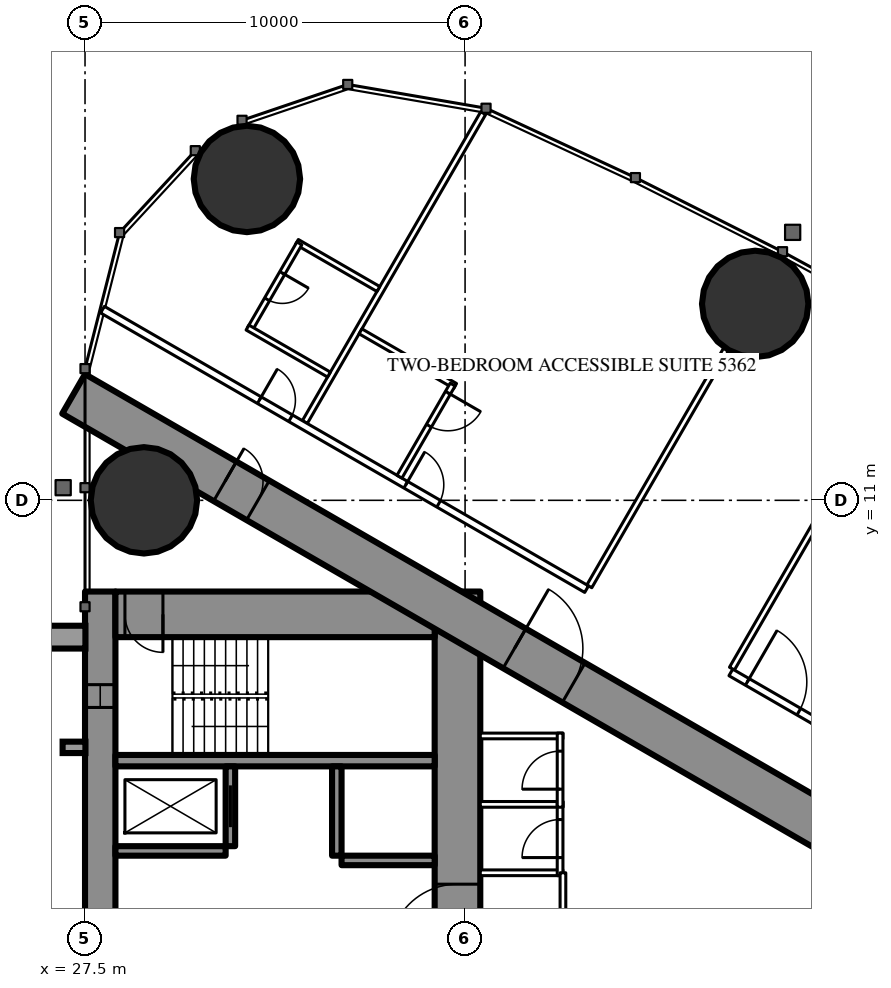
"""IFC4 building model, lengths in metres.
Left out: names, types, materials, properties, quantities, classifications, styles, units other than length and angle.
Written with IfcOpenShell. Run it as: python <this file> out.ifc"""

import sys

from ifc_helpers import new_model, si_unit, direction, frame, frame_2d, origin, origin_2d, place, context, subcontext, project, spatial, rectangle, circle, extrude, element, fill, save


model = new_model("IFC4")
c1 = context("Model", 3, precision=1e-05, world=origin(), true_north=direction((0.0, 1.0)))
c2 = subcontext(c1, "Body", "Model", "MODEL_VIEW")
j1 = project(units=[si_unit("LENGTHUNIT", "METRE"), si_unit("PLANEANGLEUNIT", "RADIAN")], contexts=[c1])
p1 = place(None, origin())
s1 = spatial("IfcSite", under=j1, at=p1, CompositionType="ELEMENT")
p2 = place(p1, origin())
s2 = spatial("IfcBuilding", under=s1, at=p2, CompositionType="ELEMENT")
p3 = place(p2, frame((0.0, 0.0, 198.3)))
s3 = spatial("IfcBuildingStorey", under=s2, at=p3, CompositionType="ELEMENT", Elevation=198.3)
for number, where, z_axis, x_axis in (
    (1, (31.76, 19.456, 0.0), (0.0, 0.0, 1.0), (1.0, 0.0, 0.0)),
    (2, (29.05, 11.0, 0.0), (0.0, 0.0, 1.0), (1.0, 0.0, 0.0)),
    (3, (45.134, 16.168, 0.0), (0.0, 0.0, 1.0), (1.0, 0.0, 0.0)),
):
    element("IfcColumn", number, at=place(p3, frame(where, z_axis=z_axis, x_axis=x_axis)), inside=s3, PredefinedType="COLUMN", context=c2, shape_type="SweptSolid", body=[
        extrude(circle(Radius=1.4, at=origin_2d()), origin(), (0.0, 0.0, 1.0), 3.5),
    ])
p4 = place(p3, frame((27.9, -8.6, 0.0), z_axis=(0.0, 0.0, 1.0), x_axis=(0.0, 1.0, 0.0)))
e4 = element("IfcWall", 4, at=p4, inside=s3, PredefinedType="SHEAR", context=c2, shape_type="SweptSolid", body=[
    extrude(rectangle(XDim=17.2, YDim=0.8, at=frame_2d((8.6, 0.0))), origin(), (0.0, 0.0, 1.0), 3.5),
])
p5 = place(p4, frame((2.45, 0.0, 0.6)))
e5 = element("IfcOpeningElement", 5, at=p5, cuts=e4, PredefinedType="OPENING", context=c2, shape_type="SweptSolid", body=[
    extrude(rectangle(XDim=0.6, YDim=2.1, at=frame_2d((0.3, 1.05))), frame((0.0, 0.41, 0.0), z_axis=(0.0, -1.0, 0.0), x_axis=(1.0, 0.0, 0.0)), (0.0, 0.0, 1.0), 0.82),
])
p6 = place(p4, frame((14.15, 0.0, 0.6)))
e6 = element("IfcOpeningElement", 6, at=p6, cuts=e4, PredefinedType="OPENING", context=c2, shape_type="SweptSolid", body=[
    extrude(rectangle(XDim=0.6, YDim=2.1, at=frame_2d((0.3, 1.05))), frame((0.0, 0.41, 0.0), z_axis=(0.0, -1.0, 0.0), x_axis=(1.0, 0.0, 0.0)), (0.0, 0.0, 1.0), 0.82),
])
p7 = place(p3, frame((37.3, -8.6, 0.0), z_axis=(0.0, 0.0, 1.0), x_axis=(0.0, 1.0, 0.0)))
e7 = element("IfcWall", 7, at=p7, inside=s3, PredefinedType="SHEAR", context=c2, shape_type="SweptSolid", body=[
    extrude(rectangle(XDim=17.2, YDim=1.2, at=frame_2d((8.6, 0.0))), origin(), (0.0, 0.0, 1.0), 3.5),
])
p8 = place(p7, frame((7.7, 0.0, 0.0)))
e8 = element("IfcOpeningElement", 8, at=p8, cuts=e7, PredefinedType="OPENING", context=c2, shape_type="SweptSolid", body=[
    extrude(rectangle(XDim=1.8, YDim=2.2, at=frame_2d((0.9, 1.1))), frame((0.0, 0.61, 0.0), z_axis=(0.0, -1.0, 0.0), x_axis=(1.0, 0.0, 0.0)), (0.0, 0.0, 1.0), 1.22),
])
p9 = place(p3, frame((28.3, 8.0, 0.0), z_axis=(0.0, 0.0, 1.0), x_axis=(1.0, 0.0, 0.0)))
e9 = element("IfcWall", 9, at=p9, inside=s3, PredefinedType="SHEAR", context=c2, shape_type="SweptSolid", body=[
    extrude(rectangle(XDim=8.4, YDim=1.2, at=frame_2d((4.2, 0.0))), origin(), (0.0, 0.0, 1.0), 3.5),
])
p10 = place(p9, frame((0.25, 0.0, 0.0)))
e10 = element("IfcOpeningElement", 10, at=p10, cuts=e9, PredefinedType="OPENING", context=c2, shape_type="SweptSolid", body=[
    extrude(rectangle(XDim=1.0, YDim=2.2, at=frame_2d((0.5, 1.1))), frame((0.0, 0.61, 0.0), z_axis=(0.0, -1.0, 0.0), x_axis=(1.0, 0.0, 0.0)), (0.0, 0.0, 1.0), 1.22),
])
p11 = place(p3, frame((28.3, 4.15, 0.0), z_axis=(0.0, 0.0, 1.0), x_axis=(1.0, 0.0, 0.0)))
e11 = element("IfcWall", 11, at=p11, inside=s3, PredefinedType="SHEAR", context=c2, shape_type="SweptSolid", body=[
    extrude(rectangle(XDim=8.4, YDim=0.3, at=frame_2d((4.2, 0.0))), origin(), (0.0, 0.0, 1.0), 3.5),
])
p12 = place(p3, frame((31.325, 1.9, 0.0), z_axis=(0.0, 0.0, 1.0), x_axis=(0.0, 1.0, 0.0)))
e12 = element("IfcWall", 12, at=p12, inside=s3, PredefinedType="SHEAR", context=c2, shape_type="SweptSolid", body=[
    extrude(rectangle(XDim=2.1, YDim=0.25, at=frame_2d((1.05, 0.0))), origin(), (0.0, 0.0, 1.0), 3.5),
])
p13 = place(p12, frame((0.5, 0.0, 0.0)))
e13 = element("IfcOpeningElement", 13, at=p13, cuts=e12, PredefinedType="OPENING", context=c2, shape_type="SweptSolid", body=[
    extrude(rectangle(XDim=1.1, YDim=2.2, at=frame_2d((0.55, 1.1))), frame((0.0, 0.135, 0.0), z_axis=(0.0, -1.0, 0.0), x_axis=(1.0, 0.0, 0.0)), (0.0, 0.0, 1.0), 0.27),
])
p14 = place(p3, frame((34.125, 1.65, 0.0), z_axis=(0.0, 0.0, 1.0), x_axis=(0.0, 1.0, 0.0)))
e14 = element("IfcWall", 14, at=p14, inside=s3, PredefinedType="SHEAR", context=c2, shape_type="SweptSolid", body=[
    extrude(rectangle(XDim=2.35, YDim=0.25, at=frame_2d((1.175, 0.0))), origin(), (0.0, 0.0, 1.0), 3.5),
])
p15 = place(p3, frame((28.3, 1.775, 0.0), z_axis=(0.0, 0.0, 1.0), x_axis=(1.0, 0.0, 0.0)))
e15 = element("IfcWall", 15, at=p15, inside=s3, PredefinedType="SHEAR", context=c2, shape_type="SweptSolid", body=[
    extrude(rectangle(XDim=2.9, YDim=0.25, at=frame_2d((1.45, 0.0))), origin(), (0.0, 0.0, 1.0), 3.5),
])
p16 = place(p3, frame((34.25, 1.525, 0.0), z_axis=(0.0, 0.0, 1.0), x_axis=(1.0, 0.0, 0.0)))
e16 = element("IfcWall", 16, at=p16, inside=s3, PredefinedType="SHEAR", context=c2, shape_type="SweptSolid", body=[
    extrude(rectangle(XDim=2.45, YDim=0.25, at=frame_2d((1.225, 0.0))), origin(), (0.0, 0.0, 1.0), 3.5),
])
p17 = place(p3, frame((27.2, -13.8, 0.0), z_axis=(0.0, 0.0, 1.0), x_axis=(0.866027159892, 0.499996958321, 0.0)))
e17 = element("IfcWall", 17, at=p17, inside=s3, PredefinedType="SHEAR", context=c2, shape_type="SweptSolid", body=[
    extrude(rectangle(XDim=27.947, YDim=1.2, at=frame_2d((13.973, 0.0))), origin(), (0.0, 0.0, 1.0), 3.5),
])
p18 = place(p17, frame((4.6, 0.0, 0.0)))
e18 = element("IfcOpeningElement", 18, at=p18, cuts=e17, PredefinedType="OPENING", context=c2, shape_type="SweptSolid", body=[
    extrude(rectangle(XDim=1.0, YDim=2.2, at=frame_2d((0.5, 1.1))), frame((0.0, 0.61, 0.0), z_axis=(0.0, -1.0, 0.0), x_axis=(1.0, 0.0, 0.0)), (0.0, 0.0, 1.0), 1.22),
])
p19 = place(p17, frame((13.395, 0.0, 0.0)))
e19 = element("IfcOpeningElement", 19, at=p19, cuts=e17, PredefinedType="OPENING", context=c2, shape_type="SweptSolid", body=[
    extrude(rectangle(XDim=1.8, YDim=2.2, at=frame_2d((0.9, 1.1))), frame((0.0, 0.61, 0.0), z_axis=(0.0, -1.0, 0.0), x_axis=(1.0, 0.0, 0.0)), (0.0, 0.0, 1.0), 1.22),
])
p20 = place(p3, frame((27.2, 13.8, 0.0), z_axis=(0.0, 0.0, 1.0), x_axis=(0.866024515034, -0.500001539357, 0.0)))
e20 = element("IfcWall", 20, at=p20, inside=s3, PredefinedType="SHEAR", context=c2, shape_type="SweptSolid", body=[
    extrude(rectangle(XDim=26.907, YDim=1.2, at=frame_2d((13.454, 0.0))), origin(), (0.0, 0.0, 1.0), 3.5),
])
p21 = place(p20, frame((4.6, 0.0, 0.0)))
e21 = element("IfcOpeningElement", 21, at=p21, cuts=e20, PredefinedType="OPENING", context=c2, shape_type="SweptSolid", body=[
    extrude(rectangle(XDim=1.0, YDim=2.2, at=frame_2d((0.5, 1.1))), frame((0.0, 0.61, 0.0), z_axis=(0.0, -1.0, 0.0), x_axis=(1.0, 0.0, 0.0)), (0.0, 0.0, 1.0), 1.22),
])
p22 = place(p20, frame((13.395, 0.0, 0.0)))
e22 = element("IfcOpeningElement", 22, at=p22, cuts=e20, PredefinedType="OPENING", context=c2, shape_type="SweptSolid", body=[
    extrude(rectangle(XDim=1.8, YDim=2.2, at=frame_2d((0.9, 1.1))), frame((0.0, 0.61, 0.0), z_axis=(0.0, -1.0, 0.0), x_axis=(1.0, 0.0, 0.0)), (0.0, 0.0, 1.0), 1.22),
])
p23 = place(p3, frame((33.284, 13.059, 0.0), z_axis=(0.0, 0.0, 1.0), x_axis=(0.499985904184, 0.866033541855, 0.0)))
e23 = element("IfcWall", 23, at=p23, inside=s3, PredefinedType="PARTITIONING", context=c2, shape_type="SweptSolid", body=[
    extrude(rectangle(XDim=9.385, YDim=0.15, at=frame_2d((4.693, 0.0))), origin(), (0.0, 0.0, 1.0), 3.25),
])
p24 = place(p3, frame((40.769, 8.737, 0.0), z_axis=(0.0, 0.0, 1.0), x_axis=(0.500013115284, 0.866017831539, 0.0)))
e24 = element("IfcWall", 24, at=p24, inside=s3, PredefinedType="PARTITIONING", context=c2, shape_type="SweptSolid", body=[
    extrude(rectangle(XDim=7.198, YDim=0.15, at=frame_2d((3.599, 0.0))), origin(), (0.0, 0.0, 1.0), 2.3),
])
p25 = place(p3, frame((44.521, 6.571, 0.0), z_axis=(0.0, 0.0, 1.0), x_axis=(0.500020376429, 0.866013639128, 0.0)))
e25 = element("IfcWall", 25, at=p25, inside=s3, PredefinedType="PARTITIONING", context=c2, shape_type="SweptSolid", body=[
    extrude(rectangle(XDim=7.306, YDim=0.15, at=frame_2d((3.653, 0.0))), origin(), (0.0, 0.0, 1.0), 2.3),
])
p26 = place(p3, frame((47.606, 6.643, 0.0), z_axis=(0.0, 0.0, 1.0), x_axis=(-0.514237157483, -0.857648031458, 0.0)))
e26 = element("IfcWall", 26, at=p26, inside=s3, PredefinedType="PARTITIONING", context=c2, shape_type="SweptSolid", body=[
    extrude(rectangle(XDim=1.805, YDim=0.15, at=frame_2d((0.902, 0.0))), origin(), (0.0, 0.0, 1.0), 3.25),
])
p27 = place(p3, frame((27.959, 16.017, 0.0), z_axis=(0.0, 0.0, 1.0), x_axis=(0.866024165033, -0.500002145574, 0.0)))
e27 = element("IfcWall", 27, at=p27, inside=s3, PredefinedType="PARTITIONING", context=c2, shape_type="SweptSolid", body=[
    extrude(rectangle(XDim=14.709, YDim=0.2, at=frame_2d((7.354, 0.0))), origin(), (0.0, 0.0, 1.0), 3.25),
])
p28 = place(p27, frame((9.215, 0.0, 0.0)))
e28 = element("IfcOpeningElement", 28, at=p28, cuts=e27, PredefinedType="OPENING", context=c2, shape_type="SweptSolid", body=[
    extrude(rectangle(XDim=1.0, YDim=2.2, at=frame_2d((0.5, 1.1))), frame((0.0, 0.11, 0.0), z_axis=(0.0, -1.0, 0.0), x_axis=(1.0, 0.0, 0.0)), (0.0, 0.0, 1.0), 0.22),
])
p29 = place(p27, frame((4.765, 0.0, 0.0)))
e29 = element("IfcOpeningElement", 29, at=p29, cuts=e27, PredefinedType="OPENING", context=c2, shape_type="SweptSolid", body=[
    extrude(rectangle(XDim=0.95, YDim=2.2, at=frame_2d((0.475, 1.1))), frame((0.0, 0.11, 0.0), z_axis=(0.0, -1.0, 0.0), x_axis=(1.0, 0.0, 0.0)), (0.0, 0.0, 1.0), 0.22),
])
p30 = place(p3, frame((44.493, 6.472, 0.0), z_axis=(0.0, 0.0, 1.0), x_axis=(0.866027140358, -0.499996992154, 0.0)))
e30 = element("IfcWall", 30, at=p30, inside=s3, PredefinedType="PARTITIONING", context=c2, shape_type="SweptSolid", body=[
    extrude(rectangle(XDim=2.566, YDim=0.2, at=frame_2d((1.283, 0.0))), origin(), (0.0, 0.0, 1.0), 3.25),
])
p31 = place(p30, frame((0.5, 0.0, 0.0)))
e31 = element("IfcOpeningElement", 31, at=p31, cuts=e30, PredefinedType="OPENING", context=c2, shape_type="SweptSolid", body=[
    extrude(rectangle(XDim=1.566, YDim=2.2, at=frame_2d((0.783, 1.1))), frame((0.0, 0.11, 0.0), z_axis=(0.0, -1.0, 0.0), x_axis=(1.0, 0.0, 0.0)), (0.0, 0.0, 1.0), 0.22),
])
p32 = place(p3, frame((34.749, 15.446, 0.0), z_axis=(0.0, 0.0, 1.0), x_axis=(0.866018712932, -0.500011588718, 0.0)))
e32 = element("IfcWall", 32, at=p32, inside=s3, PredefinedType="PARTITIONING", context=c2, shape_type="SweptSolid", body=[
    extrude(rectangle(XDim=2.875, YDim=0.15, at=frame_2d((1.438, 0.0))), origin(), (0.0, 0.0, 1.0), 3.25),
])
p33 = place(p3, frame((35.773, 11.621, 0.0), z_axis=(0.0, 0.0, 1.0), x_axis=(0.49998411664, 0.866034573852, 0.0)))
e33 = element("IfcWall", 33, at=p33, inside=s3, PredefinedType="PARTITIONING", context=c2, shape_type="SweptSolid", body=[
    extrude(rectangle(XDim=2.8, YDim=0.15, at=frame_2d((1.4, 0.0))), origin(), (0.0, 0.0, 1.0), 3.25),
])
p34 = place(p33, frame((1.55, 0.0, 0.0)))
e34 = element("IfcOpeningElement", 34, at=p34, cuts=e33, PredefinedType="OPENING", context=c2, shape_type="SweptSolid", body=[
    extrude(rectangle(XDim=1.0, YDim=2.2, at=frame_2d((0.5, 1.1))), frame((0.0, 0.085, 0.0), z_axis=(0.0, -1.0, 0.0), x_axis=(1.0, 0.0, 0.0)), (0.0, 0.0, 1.0), 0.17),
])
p35 = place(p3, frame((33.075, 17.798, 0.0), z_axis=(0.0, 0.0, 1.0), x_axis=(0.866006523861, -0.500032699561, 0.0)))
e35 = element("IfcWall", 35, at=p35, inside=s3, PredefinedType="PARTITIONING", context=c2, shape_type="SweptSolid", body=[
    extrude(rectangle(XDim=2.475, YDim=0.15, at=frame_2d((1.237, 0.0))), origin(), (0.0, 0.0, 1.0), 3.25),
])
p36 = place(p3, frame((31.84, 15.509, 0.0), z_axis=(0.0, 0.0, 1.0), x_axis=(0.500006934395, 0.866021400173, 0.0)))
e36 = element("IfcWall", 36, at=p36, inside=s3, PredefinedType="PARTITIONING", context=c2, shape_type="SweptSolid", body=[
    extrude(rectangle(XDim=2.6, YDim=0.15, at=frame_2d((1.3, 0.0))), origin(), (0.0, 0.0, 1.0), 3.25),
])
p37 = place(p36, frame((0.9, 0.0, 0.0)))
e37 = element("IfcOpeningElement", 37, at=p37, cuts=e36, PredefinedType="OPENING", context=c2, shape_type="SweptSolid", body=[
    extrude(rectangle(XDim=0.8, YDim=2.2, at=frame_2d((0.4, 1.1))), frame((0.0, 0.085, 0.0), z_axis=(0.0, -1.0, 0.0), x_axis=(1.0, 0.0, 0.0)), (0.0, 0.0, 1.0), 0.17),
])
p38 = place(p3, frame((31.775, 15.546, 0.0), z_axis=(0.0, 0.0, 1.0), x_axis=(0.866031185235, -0.4999899861, 0.0)))
e38 = element("IfcWall", 38, at=p38, inside=s3, PredefinedType="PARTITIONING", context=c2, shape_type="SweptSolid", body=[
    extrude(rectangle(XDim=2.475, YDim=0.15, at=frame_2d((1.238, 0.0))), origin(), (0.0, 0.0, 1.0), 3.25),
])
for number, where, z_axis, x_axis in (
    (39, (37.9, 1.2, 0.0), (0.0, 0.0, 1.0), (1.0, 0.0, 0.0)),
    (40, (37.9, 3.0, 0.0), (0.0, 0.0, 1.0), (1.0, 0.0, 0.0)),
    (41, (37.9, 4.8, 0.0), (0.0, 0.0, 1.0), (1.0, 0.0, 0.0)),
):
    element("IfcWall", number, at=place(p3, frame(where, z_axis=z_axis, x_axis=x_axis)), inside=s3, PredefinedType="PARTITIONING", context=c2, shape_type="SweptSolid", body=[
        extrude(rectangle(XDim=2.175, YDim=0.15, at=frame_2d((1.087, 0.0))), origin(), (0.0, 0.0, 1.0), 3.25),
    ])
p39 = place(p3, frame((40.0, 1.125, 0.0), z_axis=(0.0, 0.0, 1.0), x_axis=(0.0, 1.0, 0.0)))
e42 = element("IfcWall", 42, at=p39, inside=s3, PredefinedType="PARTITIONING", context=c2, shape_type="SweptSolid", body=[
    extrude(rectangle(XDim=1.95, YDim=0.15, at=frame_2d((0.975, 0.0))), origin(), (0.0, 0.0, 1.0), 3.25),
])
p40 = place(p39, frame((0.475, 0.0, 0.0)))
e43 = element("IfcOpeningElement", 43, at=p40, cuts=e42, PredefinedType="OPENING", context=c2, shape_type="SweptSolid", body=[
    extrude(rectangle(XDim=1.0, YDim=2.2, at=frame_2d((0.5, 1.1))), frame((0.0, 0.085, 0.0), z_axis=(0.0, -1.0, 0.0), x_axis=(1.0, 0.0, 0.0)), (0.0, 0.0, 1.0), 0.17),
])
p41 = place(p3, frame((40.0, 2.925, 0.0), z_axis=(0.0, 0.0, 1.0), x_axis=(0.0, 1.0, 0.0)))
e44 = element("IfcWall", 44, at=p41, inside=s3, PredefinedType="PARTITIONING", context=c2, shape_type="SweptSolid", body=[
    extrude(rectangle(XDim=1.95, YDim=0.15, at=frame_2d((0.975, 0.0))), origin(), (0.0, 0.0, 1.0), 3.25),
])
p42 = place(p41, frame((0.475, 0.0, 0.0)))
e45 = element("IfcOpeningElement", 45, at=p42, cuts=e44, PredefinedType="OPENING", context=c2, shape_type="SweptSolid", body=[
    extrude(rectangle(XDim=1.0, YDim=2.2, at=frame_2d((0.5, 1.1))), frame((0.0, 0.085, 0.0), z_axis=(0.0, -1.0, 0.0), x_axis=(1.0, 0.0, 0.0)), (0.0, 0.0, 1.0), 0.17),
])
p43 = place(p3, frame((40.075, -5.674, 0.0), z_axis=(0.0, 0.0, 1.0), x_axis=(0.0, 1.0, 0.0)))
e46 = element("IfcWall", 46, at=p43, inside=s3, PredefinedType="PARTITIONING", context=c2, shape_type="SweptSolid", body=[
    extrude(rectangle(XDim=6.874, YDim=0.15, at=frame_2d((3.437, 0.0))), origin(), (0.0, 0.0, 1.0), 3.25),
])
p44 = place(p43, frame((2.537, 0.0, 0.0)))
e47 = element("IfcOpeningElement", 47, at=p44, cuts=e46, PredefinedType="OPENING", context=c2, shape_type="SweptSolid", body=[
    extrude(rectangle(XDim=1.8, YDim=2.2, at=frame_2d((0.9, 1.1))), frame((0.0, 0.085, 0.0), z_axis=(0.0, -1.0, 0.0), x_axis=(1.0, 0.0, 0.0)), (0.0, 0.0, 1.0), 0.17),
])
p45 = place(p34, origin())
e48 = element("IfcDoor", 48, at=p45, inside=s3, OperationType="SINGLE_SWING_RIGHT", PredefinedType="DOOR", context=c2, shape_type="SweptSolid", body=[
    extrude(rectangle(XDim=1.0, YDim=2.2, at=frame_2d((0.5, 1.1))), frame((0.0, 0.025, 0.0), z_axis=(0.0, -1.0, 0.0), x_axis=(1.0, 0.0, 0.0)), (0.0, 0.0, 1.0), 0.05),
])
fill(e34, e48)
p46 = place(p28, origin())
e49 = element("IfcDoor", 49, at=p46, inside=s3, OperationType="SINGLE_SWING_LEFT", PredefinedType="DOOR", context=c2, shape_type="SweptSolid", body=[
    extrude(rectangle(XDim=1.0, YDim=2.2, at=frame_2d((0.5, 1.1))), frame((0.0, 0.025, 0.0), z_axis=(0.0, -1.0, 0.0), x_axis=(1.0, 0.0, 0.0)), (0.0, 0.0, 1.0), 0.05),
])
fill(e28, e49)
p47 = place(p37, origin())
e50 = element("IfcDoor", 50, at=p47, inside=s3, OperationType="SINGLE_SWING_RIGHT", PredefinedType="DOOR", context=c2, shape_type="SweptSolid", body=[
    extrude(rectangle(XDim=0.8, YDim=2.2, at=frame_2d((0.4, 1.1))), frame((0.0, 0.025, 0.0), z_axis=(0.0, -1.0, 0.0), x_axis=(1.0, 0.0, 0.0)), (0.0, 0.0, 1.0), 0.05),
])
fill(e37, e50)
p48 = place(p29, origin())
e51 = element("IfcDoor", 51, at=p48, inside=s3, OperationType="SINGLE_SWING_LEFT", PredefinedType="DOOR", context=c2, shape_type="SweptSolid", body=[
    extrude(rectangle(XDim=0.95, YDim=2.2, at=frame_2d((0.475, 1.1))), frame((0.0, 0.025, 0.0), z_axis=(0.0, -1.0, 0.0), x_axis=(1.0, 0.0, 0.0)), (0.0, 0.0, 1.0), 0.05),
])
fill(e29, e51)
p49 = place(p31, origin())
e52 = element("IfcDoor", 52, at=p49, inside=s3, OperationType="SINGLE_SWING_LEFT", PredefinedType="DOOR", context=c2, shape_type="SweptSolid", body=[
    extrude(rectangle(XDim=1.566, YDim=2.2, at=frame_2d((0.783, 1.1))), frame((0.0, 0.025, 0.0), z_axis=(0.0, -1.0, 0.0), x_axis=(1.0, 0.0, 0.0)), (0.0, 0.0, 1.0), 0.05),
])
fill(e31, e52)
p50 = place(p40, origin())
e53 = element("IfcDoor", 53, at=p50, inside=s3, OperationType="SINGLE_SWING_LEFT", PredefinedType="DOOR", context=c2, shape_type="SweptSolid", body=[
    extrude(rectangle(XDim=1.0, YDim=2.2, at=frame_2d((0.5, 1.1))), frame((0.0, 0.025, 0.0), z_axis=(0.0, -1.0, 0.0), x_axis=(1.0, 0.0, 0.0)), (0.0, 0.0, 1.0), 0.05),
])
fill(e43, e53)
p51 = place(p42, origin())
e54 = element("IfcDoor", 54, at=p51, inside=s3, OperationType="SINGLE_SWING_LEFT", PredefinedType="DOOR", context=c2, shape_type="SweptSolid", body=[
    extrude(rectangle(XDim=1.0, YDim=2.2, at=frame_2d((0.5, 1.1))), frame((0.0, 0.025, 0.0), z_axis=(0.0, -1.0, 0.0), x_axis=(1.0, 0.0, 0.0)), (0.0, 0.0, 1.0), 0.05),
])
fill(e45, e54)
p52 = place(p21, origin())
e55 = element("IfcDoor", 55, at=p52, inside=s3, OperationType="SINGLE_SWING_LEFT", PredefinedType="DOOR", context=c2, shape_type="SweptSolid", body=[
    extrude(rectangle(XDim=1.0, YDim=2.2, at=frame_2d((0.5, 1.1))), frame((0.0, 0.025, 0.0), z_axis=(0.0, -1.0, 0.0), x_axis=(1.0, 0.0, 0.0)), (0.0, 0.0, 1.0), 0.05),
])
fill(e21, e55)
p53 = place(p22, origin())
e56 = element("IfcDoor", 56, at=p53, inside=s3, OperationType="DOUBLE_DOOR_SINGLE_SWING", PredefinedType="DOOR", context=c2, shape_type="SweptSolid", body=[
    extrude(rectangle(XDim=1.8, YDim=2.2, at=frame_2d((0.9, 1.1))), frame((0.0, 0.025, 0.0), z_axis=(0.0, -1.0, 0.0), x_axis=(1.0, 0.0, 0.0)), (0.0, 0.0, 1.0), 0.05),
])
fill(e22, e56)
p54 = place(p8, origin())
e57 = element("IfcDoor", 57, at=p54, inside=s3, OperationType="DOUBLE_DOOR_SINGLE_SWING", PredefinedType="DOOR", context=c2, shape_type="SweptSolid", body=[
    extrude(rectangle(XDim=1.8, YDim=2.2, at=frame_2d((0.9, 1.1))), frame((0.0, 0.025, 0.0), z_axis=(0.0, -1.0, 0.0), x_axis=(1.0, 0.0, 0.0)), (0.0, 0.0, 1.0), 0.05),
])
fill(e8, e57)
p55 = place(p10, origin())
e58 = element("IfcDoor", 58, at=p55, inside=s3, OperationType="SINGLE_SWING_RIGHT", PredefinedType="DOOR", context=c2, shape_type="SweptSolid", body=[
    extrude(rectangle(XDim=1.0, YDim=2.2, at=frame_2d((0.5, 1.1))), frame((0.0, 0.025, 0.0), z_axis=(0.0, -1.0, 0.0), x_axis=(1.0, 0.0, 0.0)), (0.0, 0.0, 1.0), 0.05),
])
fill(e10, e58)
p56 = place(p13, origin())
e59 = element("IfcDoor", 59, at=p56, inside=s3, OperationType="SLIDING_TO_LEFT", PredefinedType="USERDEFINED", context=c2, shape_type="SweptSolid", body=[
    extrude(rectangle(XDim=1.1, YDim=2.2, at=frame_2d((0.55, 1.1))), frame((0.0, 0.025, 0.0), z_axis=(0.0, -1.0, 0.0), x_axis=(1.0, 0.0, 0.0)), (0.0, 0.0, 1.0), 0.05),
])
fill(e13, e59)
p57 = place(p6, origin())
e60 = element("IfcWindow", 60, at=p57, inside=s3, PartitioningType="SINGLE_PANEL", PredefinedType="WINDOW", context=c2, shape_type="SweptSolid", body=[
    extrude(rectangle(XDim=0.6, YDim=2.1, at=frame_2d((0.3, 1.05))), frame((0.0, 0.03, 0.0), z_axis=(0.0, -1.0, 0.0), x_axis=(1.0, 0.0, 0.0)), (0.0, 0.0, 1.0), 0.06),
])
fill(e6, e60)
save(model, sys.argv[1])
